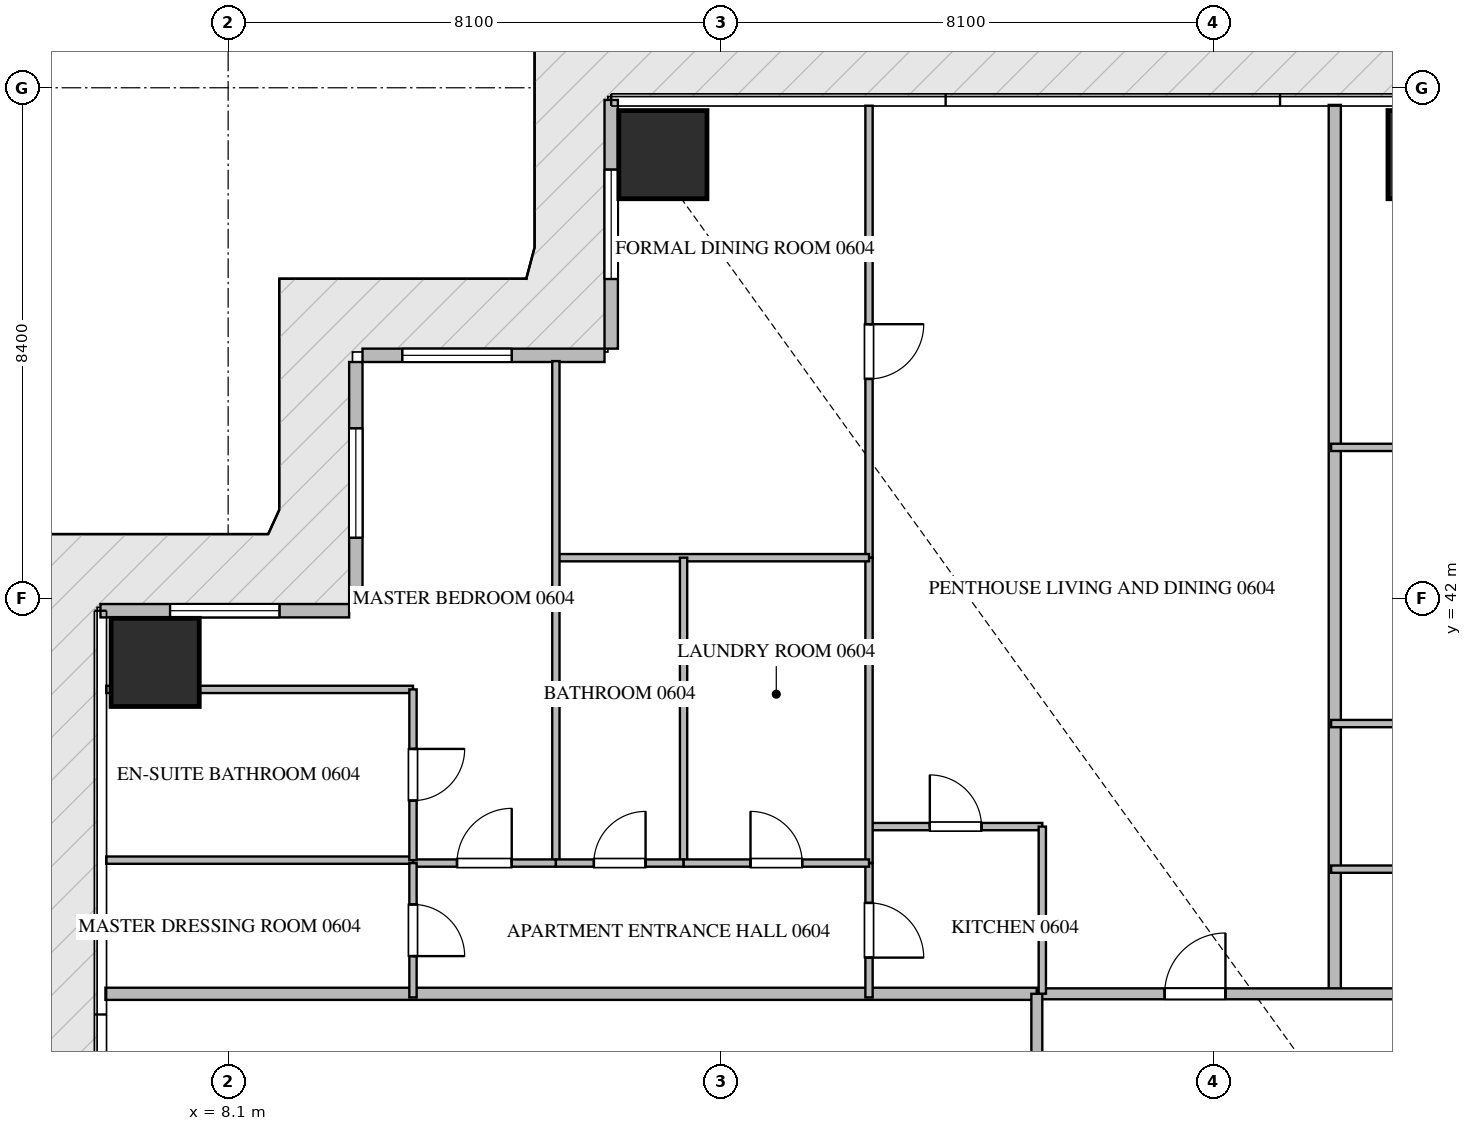
"""IFC4 building model, lengths in metres.
Left out: names, types, materials, properties, quantities, classifications, styles, units other than length and angle.
Written with IfcOpenShell. Run it as: python <this file> out.ifc"""

import sys

from ifc_helpers import new_model, si_unit, direction, frame, frame_2d, origin, origin_2d, place, context, subcontext, project, spatial, rectangle, extrude, source, transform, mapped, element, fill, save


model = new_model("IFC4")
c1 = context("Model", 3, precision=1e-05, world=origin(), true_north=direction((0.0, 1.0)))
c2 = subcontext(c1, "Body", "Model", "MODEL_VIEW")
j1 = project(units=[si_unit("LENGTHUNIT", "METRE"), si_unit("PLANEANGLEUNIT", "RADIAN")], contexts=[c1])
p1 = place(None, origin())
s1 = spatial("IfcSite", under=j1, at=p1, CompositionType="ELEMENT")
p2 = place(p1, origin())
s2 = spatial("IfcBuilding", under=s1, at=p2, CompositionType="ELEMENT")
p3 = place(p2, frame((0.0, 0.0, 30.45)))
s3 = spatial("IfcBuildingStorey", under=s2, at=p3, CompositionType="ELEMENT", Elevation=30.45)
m1 = source(origin(), c2, "Body", "SweptSolid", [
    extrude(rectangle(XDim=1.45, YDim=1.45, at=origin_2d()), origin(), (0.0, 0.0, 1.0), 3.75),
])
for number, where, z_axis, x_axis in (
    (1, (15.25, 49.3, -0.26), (0.0, 0.0, 1.0), (1.0, 0.0, 0.0)),
    (2, (27.9, 49.3, -0.26), (0.0, 0.0, 1.0), (1.0, 0.0, 0.0)),
    (3, (6.9, 40.95, -0.26), (0.0, 0.0, 1.0), (1.0, 0.0, 0.0)),
):
    element("IfcColumn", number, at=place(p3, frame(where, z_axis=z_axis, x_axis=x_axis)), inside=s3, PredefinedType="COLUMN", context=c2, shape_type="MappedRepresentation", body=[
        mapped(m1, transform((0.0, 0.0, 0.0), scale=1.0)),
    ])
p4 = place(p3, frame((14.4, 50.2, 0.0), z_axis=(0.0, 0.0, 1.0), x_axis=(0.0, -1.0, 0.0)))
e4 = element("IfcWall", 4, at=p4, inside=s3, PredefinedType="ELEMENTEDWALL", context=c2, shape_type="SweptSolid", body=[
    extrude(rectangle(XDim=4.09, YDim=0.22, at=frame_2d((2.045, 0.0))), origin(), (0.0, 0.0, 1.0), 3.475),
])
p5 = place(p4, frame((1.145, 0.0, 0.65)))
e5 = element("IfcOpeningElement", 5, at=p5, cuts=e4, PredefinedType="OPENING", context=c2, shape_type="SweptSolid", body=[
    extrude(rectangle(XDim=1.8, YDim=2.1, at=frame_2d((0.9, 1.05))), frame((0.0, 0.12, 0.0), z_axis=(0.0, -1.0, 0.0), x_axis=(1.0, 0.0, 0.0)), (0.0, 0.0, 1.0), 0.24),
])
p6 = place(p3, frame((14.29, 46.0, 0.0), z_axis=(0.0, 0.0, 1.0), x_axis=(-1.0, 0.0, 0.0)))
e6 = element("IfcWall", 6, at=p6, inside=s3, PredefinedType="ELEMENTEDWALL", context=c2, shape_type="SweptSolid", body=[
    extrude(rectangle(XDim=3.98, YDim=0.22, at=frame_2d((1.99, 0.0))), origin(), (0.0, 0.0, 1.0), 3.475),
])
p7 = place(p6, frame((1.526, 0.0, 0.65)))
e7 = element("IfcOpeningElement", 7, at=p7, cuts=e6, PredefinedType="OPENING", context=c2, shape_type="SweptSolid", body=[
    extrude(rectangle(XDim=1.8, YDim=2.1, at=frame_2d((0.9, 1.05))), frame((0.0, 0.12, 0.0), z_axis=(0.0, -1.0, 0.0), x_axis=(1.0, 0.0, 0.0)), (0.0, 0.0, 1.0), 0.24),
])
p8 = place(p3, frame((10.2, 45.89, 0.0), z_axis=(0.0, 0.0, 1.0), x_axis=(0.0, -1.0, 0.0)))
e8 = element("IfcWall", 8, at=p8, inside=s3, PredefinedType="ELEMENTEDWALL", context=c2, shape_type="SweptSolid", body=[
    extrude(rectangle(XDim=3.98, YDim=0.22, at=frame_2d((1.99, 0.0))), origin(), (0.0, 0.0, 1.0), 3.475),
])
p9 = place(p8, frame((1.09, 0.0, 0.65)))
e9 = element("IfcOpeningElement", 9, at=p9, cuts=e8, PredefinedType="OPENING", context=c2, shape_type="SweptSolid", body=[
    extrude(rectangle(XDim=1.8, YDim=2.1, at=frame_2d((0.9, 1.05))), frame((0.0, 0.12, 0.0), z_axis=(0.0, -1.0, 0.0), x_axis=(1.0, 0.0, 0.0)), (0.0, 0.0, 1.0), 0.24),
])
p10 = place(p3, frame((10.09, 41.8, 0.0), z_axis=(0.0, 0.0, 1.0), x_axis=(-1.0, 0.0, 0.0)))
e10 = element("IfcWall", 10, at=p10, inside=s3, PredefinedType="ELEMENTEDWALL", context=c2, shape_type="SweptSolid", body=[
    extrude(rectangle(XDim=4.09, YDim=0.22, at=frame_2d((2.045, 0.0))), origin(), (0.0, 0.0, 1.0), 3.475),
])
p11 = place(p10, frame((1.145, 0.0, 0.65)))
e11 = element("IfcOpeningElement", 11, at=p11, cuts=e10, PredefinedType="OPENING", context=c2, shape_type="SweptSolid", body=[
    extrude(rectangle(XDim=1.8, YDim=2.1, at=frame_2d((0.9, 1.05))), frame((0.0, 0.12, 0.0), z_axis=(0.0, -1.0, 0.0), x_axis=(1.0, 0.0, 0.0)), (0.0, 0.0, 1.0), 0.24),
])
p12 = place(p3, frame((26.3, 35.5, 0.0), z_axis=(0.0, 0.0, 1.0), x_axis=(0.0, 1.0, 0.0)))
e12 = element("IfcWall", 12, at=p12, inside=s3, PredefinedType="PARTITIONING", context=c2, shape_type="SweptSolid", body=[
    extrude(rectangle(XDim=14.618, YDim=0.2, at=frame_2d((7.309, 0.0))), origin(), (0.0, 0.0, 1.0), 3.49),
])
p13 = place(p3, frame((6.082, 35.5, 0.0), z_axis=(0.0, 0.0, 1.0), x_axis=(1.0, 0.0, 0.0)))
e13 = element("IfcWall", 13, at=p13, inside=s3, PredefinedType="PARTITIONING", context=c2, shape_type="SweptSolid", body=[
    extrude(rectangle(XDim=15.318, YDim=0.2, at=frame_2d((7.659, 0.0))), origin(), (0.0, 0.0, 1.0), 3.49),
])
p14 = place(p3, frame((21.402, 35.5, 0.0), z_axis=(0.0, 0.0, 1.0), x_axis=(1.0, 0.0, 0.0)))
e14 = element("IfcWall", 14, at=p14, inside=s3, PredefinedType="PARTITIONING", context=c2, shape_type="SweptSolid", body=[
    extrude(rectangle(XDim=21.996, YDim=0.18, at=frame_2d((10.998, 0.0))), origin(), (0.0, 0.0, 1.0), 3.49),
])
p15 = place(p14, frame((2.1, 0.0, 0.0)))
e15 = element("IfcOpeningElement", 15, at=p15, cuts=e14, PredefinedType="OPENING", context=c2, shape_type="SweptSolid", body=[
    extrude(rectangle(XDim=1.0, YDim=2.15, at=frame_2d((0.5, 1.075))), frame((0.0, 0.1, 0.0), z_axis=(0.0, -1.0, 0.0), x_axis=(1.0, 0.0, 0.0)), (0.0, 0.0, 1.0), 0.2),
])
p16 = place(p14, frame((14.277, 0.0, 0.0)))
e16 = element("IfcOpeningElement", 16, at=p16, cuts=e14, PredefinedType="OPENING", context=c2, shape_type="SweptSolid", body=[
    extrude(rectangle(XDim=1.0, YDim=2.15, at=frame_2d((0.5, 1.075))), frame((0.0, 0.1, 0.0), z_axis=(0.0, -1.0, 0.0), x_axis=(1.0, 0.0, 0.0)), (0.0, 0.0, 1.0), 0.2),
])
p17 = place(p14, frame((18.896, 0.0, 0.0)))
e17 = element("IfcOpeningElement", 17, at=p17, cuts=e14, PredefinedType="OPENING", context=c2, shape_type="SweptSolid", body=[
    extrude(rectangle(XDim=1.0, YDim=2.15, at=frame_2d((0.5, 1.075))), frame((0.0, 0.1, 0.0), z_axis=(0.0, -1.0, 0.0), x_axis=(1.0, 0.0, 0.0)), (0.0, 0.0, 1.0), 0.2),
])
p18 = place(p3, frame((21.4, 14.9, 0.0), z_axis=(0.0, 0.0, 1.0), x_axis=(0.0, 1.0, 0.0)))
e18 = element("IfcWall", 18, at=p18, inside=s3, PredefinedType="PARTITIONING", context=c2, shape_type="SweptSolid", body=[
    extrude(rectangle(XDim=20.6, YDim=0.18, at=frame_2d((10.3, 0.0))), origin(), (0.0, 0.0, 1.0), 3.49),
])
p19 = place(p18, frame((17.64, 0.0, 0.0)))
e19 = element("IfcOpeningElement", 19, at=p19, cuts=e18, PredefinedType="OPENING", context=c2, shape_type="SweptSolid", body=[
    extrude(rectangle(XDim=1.0, YDim=2.15, at=frame_2d((0.5, 1.075))), frame((0.0, 0.1, 0.0), z_axis=(0.0, -1.0, 0.0), x_axis=(1.0, 0.0, 0.0)), (0.0, 0.0, 1.0), 0.2),
])
p20 = place(p3, frame((18.64, 38.25, 0.0), z_axis=(0.0, 0.0, 1.0), x_axis=(1.0, 0.0, 0.0)))
e20 = element("IfcWall", 20, at=p20, inside=s3, PredefinedType="PARTITIONING", context=c2, shape_type="SweptSolid", body=[
    extrude(rectangle(XDim=2.85, YDim=0.12, at=frame_2d((1.425, 0.0))), origin(), (0.0, 0.0, 1.0), 3.49),
])
p21 = place(p20, frame((1.0, 0.0, 0.0)))
e21 = element("IfcOpeningElement", 21, at=p21, cuts=e20, PredefinedType="OPENING", context=c2, shape_type="SweptSolid", body=[
    extrude(rectangle(XDim=0.85, YDim=2.1, at=frame_2d((0.425, 1.05))), frame((0.0, 0.07, 0.0), z_axis=(0.0, -1.0, 0.0), x_axis=(1.0, 0.0, 0.0)), (0.0, 0.0, 1.0), 0.14),
])
p22 = place(p3, frame((21.49, 38.25, 0.0), z_axis=(0.0, 0.0, 1.0), x_axis=(0.0, -1.0, 0.0)))
e22 = element("IfcWall", 22, at=p22, inside=s3, PredefinedType="PARTITIONING", context=c2, shape_type="SweptSolid", body=[
    extrude(rectangle(XDim=2.748, YDim=0.12, at=frame_2d((1.374, 0.0))), origin(), (0.0, 0.0, 1.0), 3.49),
])
p23 = place(p3, frame((18.64, 37.65, 0.0), z_axis=(0.0, 0.0, 1.0), x_axis=(0.0, -1.0, 0.0)))
e23 = element("IfcWall", 23, at=p23, inside=s3, PredefinedType="PARTITIONING", context=c2, shape_type="SweptSolid", body=[
    extrude(rectangle(XDim=2.21, YDim=0.12, at=frame_2d((1.105, 0.0))), origin(), (0.0, 0.0, 1.0), 3.49),
])
p24 = place(p23, frame((0.655, 0.0, 0.0)))
e24 = element("IfcOpeningElement", 24, at=p24, cuts=e23, PredefinedType="OPENING", context=c2, shape_type="SweptSolid", body=[
    extrude(rectangle(XDim=0.9, YDim=2.1, at=frame_2d((0.45, 1.05))), frame((0.0, 0.07, 0.0), z_axis=(0.0, -1.0, 0.0), x_axis=(1.0, 0.0, 0.0)), (0.0, 0.0, 1.0), 0.14),
])
p25 = place(p3, frame((18.64, 50.105, 0.0), z_axis=(0.0, 0.0, 1.0), x_axis=(0.0, -1.0, 0.0)))
e25 = element("IfcWall", 25, at=p25, inside=s3, PredefinedType="PARTITIONING", context=c2, shape_type="SweptSolid", body=[
    extrude(rectangle(XDim=7.433, YDim=0.12, at=frame_2d((3.716, 0.0))), origin(), (0.0, 0.0, 1.0), 3.49),
])
p26 = place(p25, frame((3.593, 0.0, 0.0)))
e26 = element("IfcOpeningElement", 26, at=p26, cuts=e25, PredefinedType="OPENING", context=c2, shape_type="SweptSolid", body=[
    extrude(rectangle(XDim=0.9, YDim=2.1, at=frame_2d((0.45, 1.05))), frame((0.0, 0.07, 0.0), z_axis=(0.0, -1.0, 0.0), x_axis=(1.0, 0.0, 0.0)), (0.0, 0.0, 1.0), 0.14),
])
p27 = place(p3, frame((18.64, 42.67, 0.0), z_axis=(0.0, 0.0, 1.0), x_axis=(0.0, -1.0, 0.0)))
e27 = element("IfcWall", 27, at=p27, inside=s3, PredefinedType="PARTITIONING", context=c2, shape_type="SweptSolid", body=[
    extrude(rectangle(XDim=5.018, YDim=0.12, at=frame_2d((2.509, 0.0))), origin(), (0.0, 0.0, 1.0), 3.49),
])
p28 = place(p3, frame((13.49, 42.672, 0.0), z_axis=(0.0, 0.0, 1.0), x_axis=(1.0, 0.0, 0.0)))
e28 = element("IfcWall", 28, at=p28, inside=s3, PredefinedType="PARTITIONING", context=c2, shape_type="SweptSolid", body=[
    extrude(rectangle(XDim=5.15, YDim=0.12, at=frame_2d((2.575, 0.0))), origin(), (0.0, 0.0, 1.0), 3.49),
])
p29 = place(p3, frame((13.49, 45.905, 0.0), z_axis=(0.0, 0.0, 1.0), x_axis=(0.0, -1.0, 0.0)))
e29 = element("IfcWall", 29, at=p29, inside=s3, PredefinedType="PARTITIONING", context=c2, shape_type="SweptSolid", body=[
    extrude(rectangle(XDim=8.255, YDim=0.12, at=frame_2d((4.127, 0.0))), origin(), (0.0, 0.0, 1.0), 3.49),
])
p30 = place(p3, frame((15.59, 42.672, 0.0), z_axis=(0.0, 0.0, 1.0), x_axis=(0.0, -1.0, 0.0)))
e30 = element("IfcWall", 30, at=p30, inside=s3, PredefinedType="PARTITIONING", context=c2, shape_type="SweptSolid", body=[
    extrude(rectangle(XDim=5.022, YDim=0.12, at=frame_2d((2.511, 0.0))), origin(), (0.0, 0.0, 1.0), 3.49),
])
p31 = place(p3, frame((13.49, 37.65, 0.0), z_axis=(0.0, 0.0, 1.0), x_axis=(1.0, 0.0, 0.0)))
e31 = element("IfcWall", 31, at=p31, inside=s3, PredefinedType="PARTITIONING", context=c2, shape_type="SweptSolid", body=[
    extrude(rectangle(XDim=2.1, YDim=0.12, at=frame_2d((1.05, 0.0))), origin(), (0.0, 0.0, 1.0), 3.49),
])
p32 = place(p31, frame((0.625, 0.0, 0.0)))
e32 = element("IfcOpeningElement", 32, at=p32, cuts=e31, PredefinedType="OPENING", context=c2, shape_type="SweptSolid", body=[
    extrude(rectangle(XDim=0.85, YDim=2.1, at=frame_2d((0.425, 1.05))), frame((0.0, 0.07, 0.0), z_axis=(0.0, -1.0, 0.0), x_axis=(1.0, 0.0, 0.0)), (0.0, 0.0, 1.0), 0.14),
])
p33 = place(p3, frame((15.592, 37.65, 0.0), z_axis=(0.0, 0.0, 1.0), x_axis=(1.0, 0.0, 0.0)))
e33 = element("IfcWall", 33, at=p33, inside=s3, PredefinedType="PARTITIONING", context=c2, shape_type="SweptSolid", body=[
    extrude(rectangle(XDim=3.048, YDim=0.12, at=frame_2d((1.524, 0.0))), origin(), (0.0, 0.0, 1.0), 3.49),
])
p34 = place(p33, frame((1.099, 0.0, 0.0)))
e34 = element("IfcOpeningElement", 34, at=p34, cuts=e33, PredefinedType="OPENING", context=c2, shape_type="SweptSolid", body=[
    extrude(rectangle(XDim=0.85, YDim=2.1, at=frame_2d((0.425, 1.05))), frame((0.0, 0.07, 0.0), z_axis=(0.0, -1.0, 0.0), x_axis=(1.0, 0.0, 0.0)), (0.0, 0.0, 1.0), 0.14),
])
p35 = place(p3, frame((11.14, 37.65, 0.0), z_axis=(0.0, 0.0, 1.0), x_axis=(1.0, 0.0, 0.0)))
e35 = element("IfcWall", 35, at=p35, inside=s3, PredefinedType="PARTITIONING", context=c2, shape_type="SweptSolid", body=[
    extrude(rectangle(XDim=2.348, YDim=0.12, at=frame_2d((1.174, 0.0))), origin(), (0.0, 0.0, 1.0), 3.49),
])
p36 = place(p35, frame((0.724, 0.0, 0.0)))
e36 = element("IfcOpeningElement", 36, at=p36, cuts=e35, PredefinedType="OPENING", context=c2, shape_type="SweptSolid", body=[
    extrude(rectangle(XDim=0.9, YDim=2.1, at=frame_2d((0.45, 1.05))), frame((0.0, 0.07, 0.0), z_axis=(0.0, -1.0, 0.0), x_axis=(1.0, 0.0, 0.0)), (0.0, 0.0, 1.0), 0.14),
])
p37 = place(p3, frame((6.095, 40.506, 0.0), z_axis=(0.0, 0.0, 1.0), x_axis=(1.0, 0.0, 0.0)))
e37 = element("IfcWall", 37, at=p37, inside=s3, PredefinedType="PARTITIONING", context=c2, shape_type="SweptSolid", body=[
    extrude(rectangle(XDim=5.045, YDim=0.12, at=frame_2d((2.522, 0.0))), origin(), (0.0, 0.0, 1.0), 3.49),
])
p38 = place(p3, frame((6.095, 37.698, 0.0), z_axis=(0.0, 0.0, 1.0), x_axis=(1.0, 0.0, 0.0)))
e38 = element("IfcWall", 38, at=p38, inside=s3, PredefinedType="PARTITIONING", context=c2, shape_type="SweptSolid", body=[
    extrude(rectangle(XDim=5.043, YDim=0.12, at=frame_2d((2.521, 0.0))), origin(), (0.0, 0.0, 1.0), 3.49),
])
p39 = place(p3, frame((11.14, 40.506, 0.0), z_axis=(0.0, 0.0, 1.0), x_axis=(0.0, -1.0, 0.0)))
e39 = element("IfcWall", 39, at=p39, inside=s3, PredefinedType="PARTITIONING", context=c2, shape_type="SweptSolid", body=[
    extrude(rectangle(XDim=2.808, YDim=0.12, at=frame_2d((1.404, 0.0))), origin(), (0.0, 0.0, 1.0), 3.49),
])
p40 = place(p39, frame((0.979, 0.0, 0.0)))
e40 = element("IfcOpeningElement", 40, at=p40, cuts=e39, PredefinedType="OPENING", context=c2, shape_type="SweptSolid", body=[
    extrude(rectangle(XDim=0.85, YDim=2.1, at=frame_2d((0.425, 1.05))), frame((0.0, 0.07, 0.0), z_axis=(0.0, -1.0, 0.0), x_axis=(1.0, 0.0, 0.0)), (0.0, 0.0, 1.0), 0.14),
])
p41 = place(p3, frame((11.14, 37.65, 0.0), z_axis=(0.0, 0.0, 1.0), x_axis=(0.0, -1.0, 0.0)))
e41 = element("IfcWall", 41, at=p41, inside=s3, PredefinedType="PARTITIONING", context=c2, shape_type="SweptSolid", body=[
    extrude(rectangle(XDim=2.21, YDim=0.12, at=frame_2d((1.105, 0.0))), origin(), (0.0, 0.0, 1.0), 3.49),
])
p42 = place(p41, frame((0.68, 0.0, 0.0)))
e42 = element("IfcOpeningElement", 42, at=p42, cuts=e41, PredefinedType="OPENING", context=c2, shape_type="SweptSolid", body=[
    extrude(rectangle(XDim=0.85, YDim=2.1, at=frame_2d((0.425, 1.05))), frame((0.0, 0.07, 0.0), z_axis=(0.0, -1.0, 0.0), x_axis=(1.0, 0.0, 0.0)), (0.0, 0.0, 1.0), 0.14),
])
for number, where, z_axis, x_axis in (
    (43, (26.24, 44.486, 0.0), (0.0, 0.0, 1.0), (1.0, 0.0, 0.0)),
    (44, (26.24, 39.944, 0.0), (0.0, 0.0, 1.0), (1.0, 0.0, 0.0)),
    (45, (26.24, 37.55, 0.0), (0.0, 0.0, 1.0), (1.0, 0.0, 0.0)),
):
    element("IfcWall", number, at=place(p3, frame(where, z_axis=z_axis, x_axis=x_axis)), inside=s3, PredefinedType="PARTITIONING", context=c2, shape_type="SweptSolid", body=[
        extrude(rectangle(XDim=7.62, YDim=0.12, at=frame_2d((3.81, 0.0))), origin(), (0.0, 0.0, 1.0), 3.49),
    ])
m2 = source(origin(), c2, "Body", "SweptSolid", [
    extrude(rectangle(XDim=1.8, YDim=2.1, at=frame_2d((0.9, 1.05))), frame((0.0, 0.03, 0.0), z_axis=(0.0, -1.0, 0.0), x_axis=(1.0, 0.0, 0.0)), (0.0, 0.0, 1.0), 0.06),
])
p43 = place(p5, origin())
e46 = element("IfcWindow", 46, at=p43, inside=s3, PartitioningType="SINGLE_PANEL", PredefinedType="WINDOW", context=c2, shape_type="MappedRepresentation", body=[
    mapped(m2, transform((0.0, 0.0, 0.0), scale=1.0)),
])
fill(e5, e46)
p44 = place(p7, origin())
e47 = element("IfcWindow", 47, at=p44, inside=s3, PartitioningType="SINGLE_PANEL", PredefinedType="WINDOW", context=c2, shape_type="MappedRepresentation", body=[
    mapped(m2, transform((0.0, 0.0, 0.0), scale=1.0)),
])
fill(e7, e47)
p45 = place(p9, origin())
e48 = element("IfcWindow", 48, at=p45, inside=s3, PartitioningType="SINGLE_PANEL", PredefinedType="WINDOW", context=c2, shape_type="MappedRepresentation", body=[
    mapped(m2, transform((0.0, 0.0, 0.0), scale=1.0)),
])
fill(e9, e48)
p46 = place(p11, origin())
e49 = element("IfcWindow", 49, at=p46, inside=s3, PartitioningType="SINGLE_PANEL", PredefinedType="WINDOW", context=c2, shape_type="MappedRepresentation", body=[
    mapped(m2, transform((0.0, 0.0, 0.0), scale=1.0)),
])
fill(e11, e49)
m3 = source(origin(), c2, "Body", "SweptSolid", [
    extrude(rectangle(XDim=1.0, YDim=2.15, at=frame_2d((0.5, 1.075))), frame((0.0, 0.025, 0.0), z_axis=(0.0, -1.0, 0.0), x_axis=(1.0, 0.0, 0.0)), (0.0, 0.0, 1.0), 0.05),
])
p47 = place(p15, origin())
e50 = element("IfcDoor", 50, at=p47, inside=s3, OperationType="SINGLE_SWING_RIGHT", PredefinedType="DOOR", context=c2, shape_type="MappedRepresentation", body=[
    mapped(m3, transform((0.0, 0.0, 0.0), scale=1.0)),
])
fill(e15, e50)
m4 = source(origin(), c2, "Body", "SweptSolid", [
    extrude(rectangle(XDim=0.85, YDim=2.1, at=frame_2d((0.425, 1.05))), frame((0.0, 0.025, 0.0), z_axis=(0.0, -1.0, 0.0), x_axis=(1.0, 0.0, 0.0)), (0.0, 0.0, 1.0), 0.05),
])
p48 = place(p21, origin())
e51 = element("IfcDoor", 51, at=p48, inside=s3, OperationType="SINGLE_SWING_LEFT", PredefinedType="DOOR", context=c2, shape_type="MappedRepresentation", body=[
    mapped(m4, transform((0.0, 0.0, 0.0), scale=1.0)),
])
fill(e21, e51)
m5 = source(origin(), c2, "Body", "SweptSolid", [
    extrude(rectangle(XDim=0.9, YDim=2.1, at=frame_2d((0.45, 1.05))), frame((0.0, 0.025, 0.0), z_axis=(0.0, -1.0, 0.0), x_axis=(1.0, 0.0, 0.0)), (0.0, 0.0, 1.0), 0.05),
])
p49 = place(p24, origin())
e52 = element("IfcDoor", 52, at=p49, inside=s3, OperationType="SINGLE_SWING_RIGHT", PredefinedType="DOOR", context=c2, shape_type="MappedRepresentation", body=[
    mapped(m5, transform((0.0, 0.0, 0.0), scale=1.0)),
])
fill(e24, e52)
p50 = place(p26, origin())
e53 = element("IfcDoor", 53, at=p50, inside=s3, OperationType="SINGLE_SWING_LEFT", PredefinedType="DOOR", context=c2, shape_type="MappedRepresentation", body=[
    mapped(m5, transform((0.0, 0.0, 0.0), scale=1.0)),
])
fill(e26, e53)
p51 = place(p32, origin())
e54 = element("IfcDoor", 54, at=p51, inside=s3, OperationType="SINGLE_SWING_RIGHT", PredefinedType="DOOR", context=c2, shape_type="MappedRepresentation", body=[
    mapped(m4, transform((0.0, 0.0, 0.0), scale=1.0)),
])
fill(e32, e54)
p52 = place(p34, origin())
e55 = element("IfcDoor", 55, at=p52, inside=s3, OperationType="SINGLE_SWING_LEFT", PredefinedType="DOOR", context=c2, shape_type="MappedRepresentation", body=[
    mapped(m4, transform((0.0, 0.0, 0.0), scale=1.0)),
])
fill(e34, e55)
p53 = place(p36, origin())
e56 = element("IfcDoor", 56, at=p53, inside=s3, OperationType="SINGLE_SWING_RIGHT", PredefinedType="DOOR", context=c2, shape_type="MappedRepresentation", body=[
    mapped(m5, transform((0.0, 0.0, 0.0), scale=1.0)),
])
fill(e36, e56)
p54 = place(p40, origin())
e57 = element("IfcDoor", 57, at=p54, inside=s3, OperationType="SINGLE_SWING_LEFT", PredefinedType="DOOR", context=c2, shape_type="MappedRepresentation", body=[
    mapped(m4, transform((0.0, 0.0, 0.0), scale=1.0)),
])
fill(e40, e57)
p55 = place(p42, origin())
e58 = element("IfcDoor", 58, at=p55, inside=s3, OperationType="SINGLE_SWING_RIGHT", PredefinedType="DOOR", context=c2, shape_type="MappedRepresentation", body=[
    mapped(m4, transform((0.0, 0.0, 0.0), scale=1.0)),
])
fill(e42, e58)
save(model, sys.argv[1])
